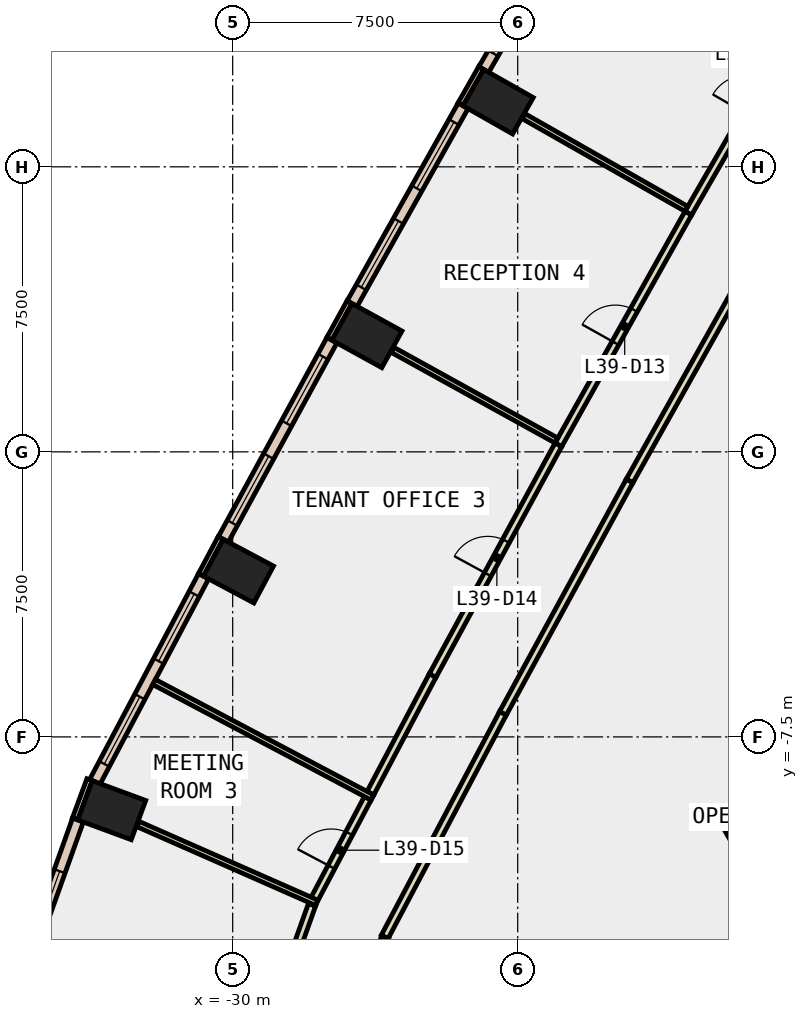
"""IFC4 building model, lengths in metres.
Left out: names, types, materials, properties, quantities, classifications, styles, units other than length and angle.
Written with IfcOpenShell. Run it as: python <this file> out.ifc"""

import sys

from ifc_helpers import new_model, si_unit, direction, frame, frame_2d, origin, origin_2d, place, context, subcontext, project, spatial, rectangle, extrude, element, fill, save


model = new_model("IFC4")
c1 = context("Model", 3, precision=1e-05, world=origin(), true_north=direction((0.0, 1.0)))
c2 = subcontext(c1, "Body", "Model", "MODEL_VIEW")
j1 = project(units=[si_unit("LENGTHUNIT", "METRE"), si_unit("PLANEANGLEUNIT", "RADIAN")], contexts=[c1])
p1 = place(None, origin())
s1 = spatial("IfcSite", under=j1, at=p1, CompositionType="ELEMENT")
p2 = place(p1, origin())
s2 = spatial("IfcBuilding", under=s1, at=p2, CompositionType="ELEMENT")
p3 = place(p2, frame((0.0, 0.0, 176.0)))
s3 = spatial("IfcBuildingStorey", under=s2, at=p3, CompositionType="ELEMENT", Elevation=176.0)
for number, where, z_axis, x_axis in (
    (1, (-23.015, 9.214, -0.4), (0.0, 0.0, 1.0), (0.494, 0.869, 0.0)),
    (2, (-26.468, 3.059, -0.4), (0.0, 0.0, 1.0), (0.482, 0.876, 0.0)),
    (3, (-29.847, -3.138, -0.4), (0.0, 0.0, 1.0), (0.47, 0.883, 0.0)),
    (4, (-33.183, -9.429, -0.4), (0.0, 0.0, 1.0), (0.347, 0.938, 0.0)),
):
    element("IfcColumn", number, at=place(p3, frame(where, z_axis=z_axis, x_axis=x_axis)), inside=s3, PredefinedType="COLUMN", context=c2, shape_type="SweptSolid", body=[
        extrude(rectangle(XDim=1.1, YDim=1.5, at=origin_2d()), origin(), (0.0, 0.0, 1.0), 4.2),
    ])
p4 = place(p3, frame((-9.31, -5.375, -0.4), z_axis=(0.0, 0.0, 1.0), x_axis=(-0.866017533419, -0.500013631625, 0.0)))
e5 = element("IfcWall", 5, at=p4, inside=s3, PredefinedType="SHEAR", context=c2, shape_type="SweptSolid", body=[
    extrude(rectangle(XDim=9.0, YDim=0.8, at=frame_2d((4.5, 0.0))), origin(), (0.0, 0.0, 1.0), 4.2),
])
p5 = place(p3, frame((-23.461, 10.1, 0.0), z_axis=(0.0, 0.0, 1.0), x_axis=(-0.494512685492, -0.869170411305, 0.0)))
e6 = element("IfcWall", 6, at=p5, inside=s3, PredefinedType="STANDARD", context=c2, shape_type="SweptSolid", body=[
    extrude(rectangle(XDim=1.1, YDim=0.15, at=frame_2d((0.55, 0.0))), origin(), (0.0, 0.0, 1.0), 3.8),
])
p6 = place(p3, frame((-26.926, 3.939, 0.0), z_axis=(0.0, 0.0, 1.0), x_axis=(-0.481850587491, -0.876253394478, 0.0)))
e7 = element("IfcWall", 7, at=p6, inside=s3, PredefinedType="STANDARD", context=c2, shape_type="SweptSolid", body=[
    extrude(rectangle(XDim=1.1, YDim=0.15, at=frame_2d((0.55, 0.0))), origin(), (0.0, 0.0, 1.0), 3.8),
])
p7 = place(p3, frame((-30.316, -2.265, 0.0), z_axis=(0.0, 0.0, 1.0), x_axis=(-0.469966207956, -0.882684407577, 0.0)))
e8 = element("IfcWall", 8, at=p7, inside=s3, PredefinedType="STANDARD", context=c2, shape_type="SweptSolid", body=[
    extrude(rectangle(XDim=1.1, YDim=0.15, at=frame_2d((0.55, 0.0))), origin(), (0.0, 0.0, 1.0), 3.8),
])
p8 = place(p3, frame((-33.766, -8.627, 0.0), z_axis=(0.0, 0.0, 1.0), x_axis=(-0.346229846278, -0.938149718087, 0.0)))
e9 = element("IfcWall", 9, at=p8, inside=s3, PredefinedType="STANDARD", context=c2, shape_type="SweptSolid", body=[
    extrude(rectangle(XDim=1.1, YDim=0.15, at=frame_2d((0.55, 0.0))), origin(), (0.0, 0.0, 1.0), 3.8),
])
p9 = place(p3, frame((-20.409, 15.23, 0.0), z_axis=(0.0, 0.0, 1.0), x_axis=(-0.499908916093, -0.866077984716, 0.0)))
e10 = element("IfcWall", 10, at=p9, inside=s3, PredefinedType="STANDARD", context=c2, shape_type="SweptSolid", body=[
    extrude(rectangle(XDim=5.969, YDim=0.3, at=frame_2d((2.985, 0.0))), origin(), (0.0, 0.0, 1.0), 3.8),
])
p10 = place(p9, frame((0.492, 0.0, 0.9)))
e11 = element("IfcOpeningElement", 11, at=p10, cuts=e10, PredefinedType="OPENING", context=c2, shape_type="SweptSolid", body=[
    extrude(rectangle(XDim=2.0, YDim=2.6, at=frame_2d((1.0, 1.3))), frame((0.0, 0.16, 0.0), z_axis=(0.0, -1.0, 0.0), x_axis=(1.0, 0.0, 0.0)), (0.0, 0.0, 1.0), 0.32),
])
p11 = place(p9, frame((3.477, 0.0, 0.9)))
e12 = element("IfcOpeningElement", 12, at=p11, cuts=e10, PredefinedType="OPENING", context=c2, shape_type="SweptSolid", body=[
    extrude(rectangle(XDim=2.0, YDim=2.6, at=frame_2d((1.0, 1.3))), frame((0.0, 0.16, 0.0), z_axis=(0.0, -1.0, 0.0), x_axis=(1.0, 0.0, 0.0)), (0.0, 0.0, 1.0), 0.32),
])
p12 = place(p3, frame((-23.936, 9.106, 0.0), z_axis=(0.0, 0.0, 1.0), x_axis=(-0.489305602904, -0.872112393541, 0.0)))
e13 = element("IfcWall", 13, at=p12, inside=s3, PredefinedType="STANDARD", context=c2, shape_type="SweptSolid", body=[
    extrude(rectangle(XDim=5.969, YDim=0.3, at=frame_2d((2.985, 0.0))), origin(), (0.0, 0.0, 1.0), 3.8),
])
p13 = place(p12, frame((0.492, 0.0, 0.9)))
e14 = element("IfcOpeningElement", 14, at=p13, cuts=e13, PredefinedType="OPENING", context=c2, shape_type="SweptSolid", body=[
    extrude(rectangle(XDim=2.0, YDim=2.6, at=frame_2d((1.0, 1.3))), frame((0.0, 0.16, 0.0), z_axis=(0.0, -1.0, 0.0), x_axis=(1.0, 0.0, 0.0)), (0.0, 0.0, 1.0), 0.32),
])
p14 = place(p12, frame((3.477, 0.0, 0.9)))
e15 = element("IfcOpeningElement", 15, at=p14, cuts=e13, PredefinedType="OPENING", context=c2, shape_type="SweptSolid", body=[
    extrude(rectangle(XDim=2.0, YDim=2.6, at=frame_2d((1.0, 1.3))), frame((0.0, 0.16, 0.0), z_axis=(0.0, -1.0, 0.0), x_axis=(1.0, 0.0, 0.0)), (0.0, 0.0, 1.0), 0.32),
])
p15 = place(p3, frame((-27.388, 2.939, 0.0), z_axis=(0.0, 0.0, 1.0), x_axis=(-0.478711740571, -0.877972134774, 0.0)))
e16 = element("IfcWall", 16, at=p15, inside=s3, PredefinedType="STANDARD", context=c2, shape_type="SweptSolid", body=[
    extrude(rectangle(XDim=5.97, YDim=0.3, at=frame_2d((2.985, 0.0))), origin(), (0.0, 0.0, 1.0), 3.8),
])
p16 = place(p15, frame((0.493, 0.0, 0.9)))
e17 = element("IfcOpeningElement", 17, at=p16, cuts=e16, PredefinedType="OPENING", context=c2, shape_type="SweptSolid", body=[
    extrude(rectangle(XDim=2.0, YDim=2.6, at=frame_2d((1.0, 1.3))), frame((0.0, 0.16, 0.0), z_axis=(0.0, -1.0, 0.0), x_axis=(1.0, 0.0, 0.0)), (0.0, 0.0, 1.0), 0.32),
])
p17 = place(p15, frame((3.478, 0.0, 0.9)))
e18 = element("IfcOpeningElement", 18, at=p17, cuts=e16, PredefinedType="OPENING", context=c2, shape_type="SweptSolid", body=[
    extrude(rectangle(XDim=2.0, YDim=2.6, at=frame_2d((1.0, 1.3))), frame((0.0, 0.16, 0.0), z_axis=(0.0, -1.0, 0.0), x_axis=(1.0, 0.0, 0.0)), (0.0, 0.0, 1.0), 0.32),
])
p18 = place(p3, frame((-30.765, -3.271, 0.0), z_axis=(0.0, 0.0, 1.0), x_axis=(-0.467572383403, -0.883954787463, 0.0)))
e19 = element("IfcWall", 19, at=p18, inside=s3, PredefinedType="STANDARD", context=c2, shape_type="SweptSolid", body=[
    extrude(rectangle(XDim=6.119, YDim=0.3, at=frame_2d((3.06, 0.0))), origin(), (0.0, 0.0, 1.0), 3.8),
])
p19 = place(p18, frame((0.53, 0.0, 0.9)))
e20 = element("IfcOpeningElement", 20, at=p19, cuts=e19, PredefinedType="OPENING", context=c2, shape_type="SweptSolid", body=[
    extrude(rectangle(XDim=2.0, YDim=2.6, at=frame_2d((1.0, 1.3))), frame((0.0, 0.16, 0.0), z_axis=(0.0, -1.0, 0.0), x_axis=(1.0, 0.0, 0.0)), (0.0, 0.0, 1.0), 0.32),
])
p20 = place(p18, frame((3.589, 0.0, 0.9)))
e21 = element("IfcOpeningElement", 21, at=p20, cuts=e19, PredefinedType="OPENING", context=c2, shape_type="SweptSolid", body=[
    extrude(rectangle(XDim=2.0, YDim=2.6, at=frame_2d((1.0, 1.3))), frame((0.0, 0.16, 0.0), z_axis=(0.0, -1.0, 0.0), x_axis=(1.0, 0.0, 0.0)), (0.0, 0.0, 1.0), 0.32),
])
p21 = place(p3, frame((-34.071, -9.686, 0.0), z_axis=(0.0, 0.0, 1.0), x_axis=(-0.336652028742, -0.941629126325, 0.0)))
e22 = element("IfcWall", 22, at=p21, inside=s3, PredefinedType="STANDARD", context=c2, shape_type="SweptSolid", body=[
    extrude(rectangle(XDim=4.263, YDim=0.3, at=frame_2d((2.131, 0.0))), origin(), (0.0, 0.0, 1.0), 3.8),
])
p22 = place(p21, frame((1.431, 0.0, 0.9)))
e23 = element("IfcOpeningElement", 23, at=p22, cuts=e22, PredefinedType="OPENING", context=c2, shape_type="SweptSolid", body=[
    extrude(rectangle(XDim=1.4, YDim=2.6, at=frame_2d((0.7, 1.3))), frame((0.0, 0.16, 0.0), z_axis=(0.0, -1.0, 0.0), x_axis=(1.0, 0.0, 0.0)), (0.0, 0.0, 1.0), 0.32),
])
p23 = place(p3, frame((-22.888, -6.878, 0.0), z_axis=(0.0, 0.0, 1.0), x_axis=(-0.467533790284, -0.883975200411, 0.0)))
e24 = element("IfcWall", 24, at=p23, inside=s3, PredefinedType="PARTITIONING", context=c2, shape_type="SweptSolid", body=[
    extrude(rectangle(XDim=6.656, YDim=0.2, at=frame_2d((3.328, 0.0))), origin(), (0.0, 0.0, 1.0), 3.75),
])
p24 = place(p3, frame((-25.987, -12.768, 0.0), z_axis=(0.0, 0.0, 1.0), x_axis=(-0.33645112914, -0.941700927949, 0.0)))
e25 = element("IfcWall", 25, at=p24, inside=s3, PredefinedType="PARTITIONING", context=c2, shape_type="SweptSolid", body=[
    extrude(rectangle(XDim=2.292, YDim=0.2, at=frame_2d((1.146, 0.0))), origin(), (0.0, 0.0, 1.0), 3.75),
])
p25 = place(p3, frame((-16.299, 5.04, 0.0), z_axis=(0.0, 0.0, 1.0), x_axis=(-0.489219677344, -0.872160597195, 0.0)))
e26 = element("IfcWall", 26, at=p25, inside=s3, PredefinedType="PARTITIONING", context=c2, shape_type="SweptSolid", body=[
    extrude(rectangle(XDim=6.657, YDim=0.2, at=frame_2d((3.329, 0.0))), origin(), (0.0, 0.0, 1.0), 3.75),
])
p26 = place(p3, frame((-19.556, -0.766, 0.0), z_axis=(0.0, 0.0, 1.0), x_axis=(-0.478665365973, -0.877997418799, 0.0)))
e27 = element("IfcWall", 27, at=p26, inside=s3, PredefinedType="PARTITIONING", context=c2, shape_type="SweptSolid", body=[
    extrude(rectangle(XDim=6.961, YDim=0.2, at=frame_2d((3.48, 0.0))), origin(), (0.0, 0.0, 1.0), 3.75),
])
p27 = place(p3, frame((-18.012, 6.28, 0.0), z_axis=(0.0, 0.0, 1.0), x_axis=(0.49995092924, 0.866053732947, 0.0)))
e28 = element("IfcWall", 28, at=p27, inside=s3, PredefinedType="PARTITIONING", context=c2, shape_type="SweptSolid", body=[
    extrude(rectangle(XDim=7.061, YDim=0.2, at=frame_2d((3.53, 0.0))), origin(), (0.0, 0.0, 1.0), 3.75),
])
p28 = place(p27, frame((3.03, 0.0, 0.0)))
e29 = element("IfcOpeningElement", 29, at=p28, cuts=e28, PredefinedType="OPENING", context=c2, shape_type="SweptSolid", body=[
    extrude(rectangle(XDim=1.0, YDim=2.1, at=frame_2d((0.5, 1.05))), frame((0.0, 0.11, 0.0), z_axis=(0.0, -1.0, 0.0), x_axis=(1.0, 0.0, 0.0)), (0.0, 0.0, 1.0), 0.22),
])
p29 = place(p3, frame((-21.43, 0.185, 0.0), z_axis=(0.0, 0.0, 1.0), x_axis=(0.489124577711, 0.872213934468, 0.0)))
e30 = element("IfcWall", 30, at=p29, inside=s3, PredefinedType="PARTITIONING", context=c2, shape_type="SweptSolid", body=[
    extrude(rectangle(XDim=6.988, YDim=0.2, at=frame_2d((3.494, 0.0))), origin(), (0.0, 0.0, 1.0), 3.75),
])
p30 = place(p29, frame((3.069, 0.0, 0.0)))
e31 = element("IfcOpeningElement", 31, at=p30, cuts=e30, PredefinedType="OPENING", context=c2, shape_type="SweptSolid", body=[
    extrude(rectangle(XDim=1.0, YDim=2.1, at=frame_2d((0.5, 1.05))), frame((0.0, 0.11, 0.0), z_axis=(0.0, -1.0, 0.0), x_axis=(1.0, 0.0, 0.0)), (0.0, 0.0, 1.0), 0.22),
])
p31 = place(p3, frame((-26.376, -8.982, 0.0), z_axis=(0.0, 0.0, 1.0), x_axis=(0.467529077139, 0.883977693174, 0.0)))
e32 = element("IfcWall", 32, at=p31, inside=s3, PredefinedType="PARTITIONING", context=c2, shape_type="SweptSolid", body=[
    extrude(rectangle(XDim=3.503, YDim=0.2, at=frame_2d((1.752, 0.0))), origin(), (0.0, 0.0, 1.0), 3.75),
])
p32 = place(p3, frame((-24.738, -5.885, 0.0), z_axis=(0.0, 0.0, 1.0), x_axis=(0.478535377863, 0.878068273048, 0.0)))
e33 = element("IfcWall", 33, at=p32, inside=s3, PredefinedType="PARTITIONING", context=c2, shape_type="SweptSolid", body=[
    extrude(rectangle(XDim=6.913, YDim=0.2, at=frame_2d((3.457, 0.0))), origin(), (0.0, 0.0, 1.0), 3.75),
])
p33 = place(p32, frame((3.031, 0.0, 0.0)))
e34 = element("IfcOpeningElement", 34, at=p33, cuts=e33, PredefinedType="OPENING", context=c2, shape_type="SweptSolid", body=[
    extrude(rectangle(XDim=1.0, YDim=2.1, at=frame_2d((0.5, 1.05))), frame((0.0, 0.11, 0.0), z_axis=(0.0, -1.0, 0.0), x_axis=(1.0, 0.0, 0.0)), (0.0, 0.0, 1.0), 0.22),
])
p34 = place(p3, frame((-27.891, -11.847, 0.0), z_axis=(0.0, 0.0, 1.0), x_axis=(0.467571923705, 0.883955030623, 0.0)))
e35 = element("IfcWall", 35, at=p34, inside=s3, PredefinedType="PARTITIONING", context=c2, shape_type="SweptSolid", body=[
    extrude(rectangle(XDim=3.091, YDim=0.2, at=frame_2d((1.545, 0.0))), origin(), (0.0, 0.0, 1.0), 3.75),
])
p35 = place(p34, frame((1.045, 0.0, 0.0)))
e36 = element("IfcOpeningElement", 36, at=p35, cuts=e35, PredefinedType="OPENING", context=c2, shape_type="SweptSolid", body=[
    extrude(rectangle(XDim=1.0, YDim=2.1, at=frame_2d((0.5, 1.05))), frame((0.0, 0.11, 0.0), z_axis=(0.0, -1.0, 0.0), x_axis=(1.0, 0.0, 0.0)), (0.0, 0.0, 1.0), 0.22),
])
p36 = place(p3, frame((-28.94, -14.789, 0.0), z_axis=(0.0, 0.0, 1.0), x_axis=(0.336864004528, 0.941553313654, 0.0)))
e37 = element("IfcWall", 37, at=p36, inside=s3, PredefinedType="PARTITIONING", context=c2, shape_type="SweptSolid", body=[
    extrude(rectangle(XDim=3.048, YDim=0.2, at=frame_2d((1.524, 0.0))), origin(), (0.0, 0.0, 1.0), 3.75),
])
p37 = place(p3, frame((-18.062, 6.395, 0.0), z_axis=(0.0, 0.0, 1.0), x_axis=(-0.869113540562, 0.494612629854, 0.0)))
e38 = element("IfcWall", 38, at=p37, inside=s3, PredefinedType="PARTITIONING", context=c2, shape_type="SweptSolid", body=[
    extrude(rectangle(XDim=4.929, YDim=0.15, at=frame_2d((2.465, 0.0))), origin(), (0.0, 0.0, 1.0), 3.75),
])
p38 = place(p3, frame((-21.481, 0.299, 0.0), z_axis=(0.0, 0.0, 1.0), x_axis=(-0.875073760972, 0.483989579286, 0.0)))
e39 = element("IfcWall", 39, at=p38, inside=s3, PredefinedType="PARTITIONING", context=c2, shape_type="SweptSolid", body=[
    extrude(rectangle(XDim=4.93, YDim=0.15, at=frame_2d((2.465, 0.0))), origin(), (0.0, 0.0, 1.0), 3.75),
])
p39 = place(p3, frame((-26.323, -9.095, 0.0), z_axis=(0.0, 0.0, 1.0), x_axis=(-0.883977869384, 0.467528743971, 0.0)))
e40 = element("IfcWall", 40, at=p39, inside=s3, PredefinedType="PARTITIONING", context=c2, shape_type="SweptSolid", body=[
    extrude(rectangle(XDim=6.5, YDim=0.15, at=frame_2d((3.25, 0.0))), origin(), (0.0, 0.0, 1.0), 3.75),
])
p40 = place(p3, frame((-27.788, -11.865, 0.0), z_axis=(0.0, 0.0, 1.0), x_axis=(-0.915139307711, 0.403137752489, 0.0)))
e41 = element("IfcWall", 41, at=p40, inside=s3, PredefinedType="PARTITIONING", context=c2, shape_type="SweptSolid", body=[
    extrude(rectangle(XDim=5.145, YDim=0.15, at=frame_2d((2.572, 0.0))), origin(), (0.0, 0.0, 1.0), 3.75),
])
p41 = place(p11, origin())
e42 = element("IfcWindow", 42, at=p41, inside=s3, PartitioningType="SINGLE_PANEL", PredefinedType="WINDOW", context=c2, shape_type="SweptSolid", body=[
    extrude(rectangle(XDim=2.0, YDim=2.6, at=frame_2d((1.0, 1.3))), frame((0.0, 0.03, 0.0), z_axis=(0.0, -1.0, 0.0), x_axis=(1.0, 0.0, 0.0)), (0.0, 0.0, 1.0), 0.06),
])
fill(e12, e42)
p42 = place(p13, origin())
e43 = element("IfcWindow", 43, at=p42, inside=s3, PartitioningType="SINGLE_PANEL", PredefinedType="WINDOW", context=c2, shape_type="SweptSolid", body=[
    extrude(rectangle(XDim=2.0, YDim=2.6, at=frame_2d((1.0, 1.3))), frame((0.0, 0.03, 0.0), z_axis=(0.0, -1.0, 0.0), x_axis=(1.0, 0.0, 0.0)), (0.0, 0.0, 1.0), 0.06),
])
fill(e14, e43)
p43 = place(p14, origin())
e44 = element("IfcWindow", 44, at=p43, inside=s3, PartitioningType="SINGLE_PANEL", PredefinedType="WINDOW", context=c2, shape_type="SweptSolid", body=[
    extrude(rectangle(XDim=2.0, YDim=2.6, at=frame_2d((1.0, 1.3))), frame((0.0, 0.03, 0.0), z_axis=(0.0, -1.0, 0.0), x_axis=(1.0, 0.0, 0.0)), (0.0, 0.0, 1.0), 0.06),
])
fill(e15, e44)
p44 = place(p16, origin())
e45 = element("IfcWindow", 45, at=p44, inside=s3, PartitioningType="SINGLE_PANEL", PredefinedType="WINDOW", context=c2, shape_type="SweptSolid", body=[
    extrude(rectangle(XDim=2.0, YDim=2.6, at=frame_2d((1.0, 1.3))), frame((0.0, 0.03, 0.0), z_axis=(0.0, -1.0, 0.0), x_axis=(1.0, 0.0, 0.0)), (0.0, 0.0, 1.0), 0.06),
])
fill(e17, e45)
p45 = place(p17, origin())
e46 = element("IfcWindow", 46, at=p45, inside=s3, PartitioningType="SINGLE_PANEL", PredefinedType="WINDOW", context=c2, shape_type="SweptSolid", body=[
    extrude(rectangle(XDim=2.0, YDim=2.6, at=frame_2d((1.0, 1.3))), frame((0.0, 0.03, 0.0), z_axis=(0.0, -1.0, 0.0), x_axis=(1.0, 0.0, 0.0)), (0.0, 0.0, 1.0), 0.06),
])
fill(e18, e46)
p46 = place(p19, origin())
e47 = element("IfcWindow", 47, at=p46, inside=s3, PartitioningType="SINGLE_PANEL", PredefinedType="WINDOW", context=c2, shape_type="SweptSolid", body=[
    extrude(rectangle(XDim=2.0, YDim=2.6, at=frame_2d((1.0, 1.3))), frame((0.0, 0.03, 0.0), z_axis=(0.0, -1.0, 0.0), x_axis=(1.0, 0.0, 0.0)), (0.0, 0.0, 1.0), 0.06),
])
fill(e20, e47)
p47 = place(p20, origin())
e48 = element("IfcWindow", 48, at=p47, inside=s3, PartitioningType="SINGLE_PANEL", PredefinedType="WINDOW", context=c2, shape_type="SweptSolid", body=[
    extrude(rectangle(XDim=2.0, YDim=2.6, at=frame_2d((1.0, 1.3))), frame((0.0, 0.03, 0.0), z_axis=(0.0, -1.0, 0.0), x_axis=(1.0, 0.0, 0.0)), (0.0, 0.0, 1.0), 0.06),
])
fill(e21, e48)
p48 = place(p22, origin())
e49 = element("IfcWindow", 49, at=p48, inside=s3, PartitioningType="SINGLE_PANEL", PredefinedType="WINDOW", context=c2, shape_type="SweptSolid", body=[
    extrude(rectangle(XDim=1.4, YDim=2.6, at=frame_2d((0.7, 1.3))), frame((0.0, 0.03, 0.0), z_axis=(0.0, -1.0, 0.0), x_axis=(1.0, 0.0, 0.0)), (0.0, 0.0, 1.0), 0.06),
])
fill(e23, e49)
p49 = place(p30, origin())
e50 = element("IfcDoor", 50, at=p49, inside=s3, OperationType="SINGLE_SWING_LEFT", PredefinedType="DOOR", context=c2, shape_type="SweptSolid", body=[
    extrude(rectangle(XDim=1.0, YDim=2.1, at=frame_2d((0.5, 1.05))), frame((0.0, 0.025, 0.0), z_axis=(0.0, -1.0, 0.0), x_axis=(1.0, 0.0, 0.0)), (0.0, 0.0, 1.0), 0.05),
])
fill(e31, e50)
p50 = place(p33, origin())
e51 = element("IfcDoor", 51, at=p50, inside=s3, OperationType="SINGLE_SWING_RIGHT", PredefinedType="DOOR", context=c2, shape_type="SweptSolid", body=[
    extrude(rectangle(XDim=1.0, YDim=2.1, at=frame_2d((0.5, 1.05))), frame((0.0, 0.025, 0.0), z_axis=(0.0, -1.0, 0.0), x_axis=(1.0, 0.0, 0.0)), (0.0, 0.0, 1.0), 0.05),
])
fill(e34, e51)
p51 = place(p35, origin())
e52 = element("IfcDoor", 52, at=p51, inside=s3, OperationType="SINGLE_SWING_LEFT", PredefinedType="DOOR", context=c2, shape_type="SweptSolid", body=[
    extrude(rectangle(XDim=1.0, YDim=2.1, at=frame_2d((0.5, 1.05))), frame((0.0, 0.025, 0.0), z_axis=(0.0, -1.0, 0.0), x_axis=(1.0, 0.0, 0.0)), (0.0, 0.0, 1.0), 0.05),
])
fill(e36, e52)
save(model, sys.argv[1])
